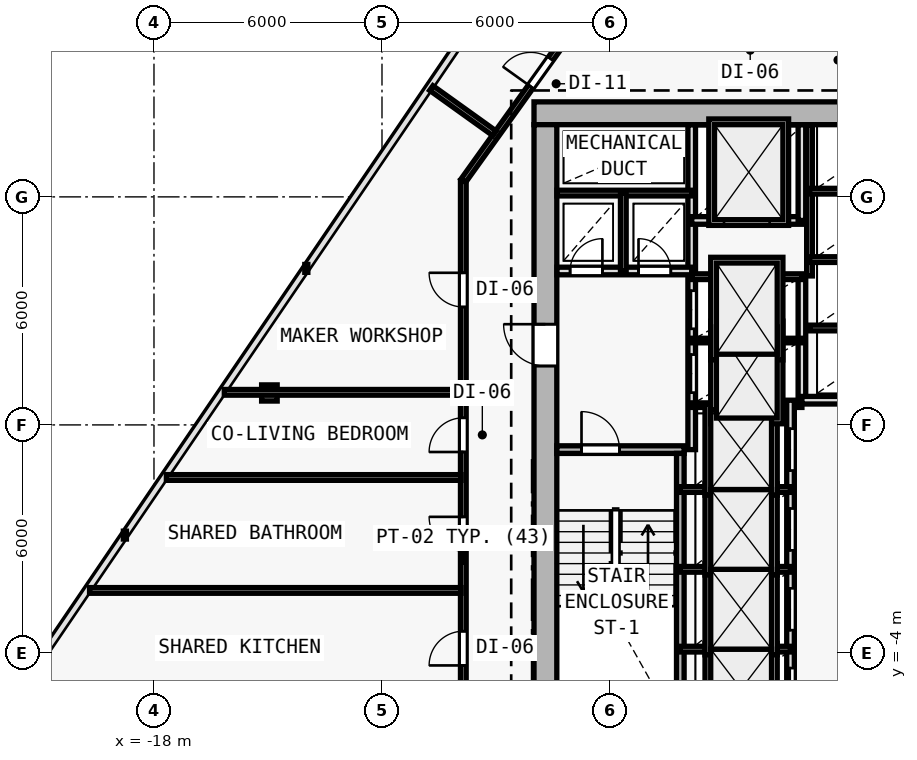
"""IFC4 building model, lengths in metres.
Left out: names, types, materials, properties, quantities, classifications, styles, units other than length and angle.
Written with IfcOpenShell. Run it as: python <this file> out.ifc"""

import sys

from ifc_helpers import new_model, si_unit, direction, frame, frame_2d, origin, origin_2d, place, context, subcontext, project, spatial, rectangle, i_section, extrude, element, fill, save


model = new_model("IFC4")
c1 = context("Model", 3, precision=1e-05, world=origin(), true_north=direction((0.0, 1.0)))
c2 = subcontext(c1, "Body", "Model", "MODEL_VIEW")
j1 = project(units=[si_unit("LENGTHUNIT", "METRE"), si_unit("PLANEANGLEUNIT", "RADIAN")], contexts=[c1])
p1 = place(None, origin())
s1 = spatial("IfcSite", under=j1, at=p1, CompositionType="ELEMENT")
p2 = place(p1, origin())
s2 = spatial("IfcBuilding", under=s1, at=p2, CompositionType="ELEMENT")
p3 = place(p2, frame((0.0, 0.0, 100.5)))
s3 = spatial("IfcBuildingStorey", under=s2, at=p3, CompositionType="ELEMENT", Elevation=100.5)
for number, where, z_axis, x_axis in (
    (1, (-7.7, 10.2, 0.0), (0.0, 0.0, 1.0), (1.0, 0.0, 0.0)),
    (2, (-7.7, 2.0, 0.0), (0.0, 0.0, 1.0), (1.0, 0.0, 0.0)),
):
    element("IfcColumn", number, at=place(p3, frame(where, z_axis=z_axis, x_axis=x_axis)), inside=s3, PredefinedType="COLUMN", context=c2, shape_type="SweptSolid", body=[
        extrude(i_section(OverallWidth=0.409, OverallDepth=0.425, WebThickness=0.021, FlangeThickness=0.034, FilletRadius=0.015, at=origin_2d()), origin(), (0.0, 0.0, 1.0), 3.6),
    ])
p4 = place(p3, frame((-14.963, 2.84, 0.006), z_axis=(0.017003561856, 0.009590008887, 0.99980943715), x_axis=(-0.491253415567, 0.871016694268, 0.0)))
e3 = element("IfcColumn", 3, at=p4, inside=s3, PredefinedType="COLUMN", context=c2, shape_type="SweptSolid", body=[
    extrude(i_section(OverallWidth=0.409, OverallDepth=0.425, WebThickness=0.021, FlangeThickness=0.034, FilletRadius=0.015, at=origin_2d()), origin(), (0.0, 0.0, 1.0), 3.59),
])
p5 = place(p3, frame((8.0, 10.2, 0.0), z_axis=(0.0, 0.0, 1.0), x_axis=(-1.0, 0.0, 0.0)))
e4 = element("IfcWall", 4, at=p5, inside=s3, PredefinedType="SHEAR", context=c2, shape_type="SweptSolid", body=[
    extrude(rectangle(XDim=16.0, YDim=0.6, at=frame_2d((8.0, 0.0))), origin(), (0.0, 0.0, 1.0), 3.35),
])
p6 = place(p5, frame((4.45, 0.0, 0.0)))
e5 = element("IfcOpeningElement", 5, at=p6, cuts=e4, PredefinedType="OPENING", context=c2, shape_type="SweptSolid", body=[
    extrude(rectangle(XDim=1.1, YDim=2.15, at=frame_2d((0.55, 1.075))), frame((0.0, 0.31, 0.0), z_axis=(0.0, -1.0, 0.0), x_axis=(1.0, 0.0, 0.0)), (0.0, 0.0, 1.0), 0.62),
])
p7 = place(p3, frame((-7.7, -9.1, 0.0), z_axis=(0.0, 0.0, 1.0), x_axis=(0.0, 1.0, 0.0)))
e6 = element("IfcWall", 6, at=p7, inside=s3, PredefinedType="SHEAR", context=c2, shape_type="SweptSolid", body=[
    extrude(rectangle(XDim=19.0, YDim=0.6, at=frame_2d((9.5, 0.0))), origin(), (0.0, 0.0, 1.0), 3.35),
])
p8 = place(p7, frame((12.65, 0.0, 0.0)))
e7 = element("IfcOpeningElement", 7, at=p8, cuts=e6, PredefinedType="OPENING", context=c2, shape_type="SweptSolid", body=[
    extrude(rectangle(XDim=1.1, YDim=2.15, at=frame_2d((0.55, 1.075))), frame((0.0, 0.31, 0.0), z_axis=(0.0, -1.0, 0.0), x_axis=(1.0, 0.0, 0.0)), (0.0, 0.0, 1.0), 0.62),
])
p9 = place(p3, frame((-7.4, 1.35, 0.0), z_axis=(0.0, 0.0, 1.0), x_axis=(1.0, 0.0, 0.0)))
e8 = element("IfcWall", 8, at=p9, inside=s3, PredefinedType="SOLIDWALL", context=c2, shape_type="SweptSolid", body=[
    extrude(rectangle(XDim=3.35, YDim=0.2, at=frame_2d((1.675, 0.0))), origin(), (0.0, 0.0, 1.0), 3.35),
])
p10 = place(p9, frame((0.65, 0.0, 0.0)))
e9 = element("IfcOpeningElement", 9, at=p10, cuts=e8, PredefinedType="OPENING", context=c2, shape_type="SweptSolid", body=[
    extrude(rectangle(XDim=1.0, YDim=2.15, at=frame_2d((0.5, 1.075))), frame((0.0, 0.11, 0.0), z_axis=(0.0, -1.0, 0.0), x_axis=(1.0, 0.0, 0.0)), (0.0, 0.0, 1.0), 0.22),
])
p11 = place(p3, frame((-4.15, -5.95, 0.0), z_axis=(0.0, 0.0, 1.0), x_axis=(0.0, 1.0, 0.0)))
e10 = element("IfcWall", 10, at=p11, inside=s3, PredefinedType="SOLIDWALL", context=c2, shape_type="SweptSolid", body=[
    extrude(rectangle(XDim=7.2, YDim=0.2, at=frame_2d((3.6, 0.0))), origin(), (0.0, 0.0, 1.0), 3.35),
])
p12 = place(p3, frame((-3.85, 1.35, 0.0), z_axis=(0.0, 0.0, 1.0), x_axis=(0.0, 1.0, 0.0)))
e11 = element("IfcWall", 11, at=p12, inside=s3, PredefinedType="SOLIDWALL", context=c2, shape_type="SweptSolid", body=[
    extrude(rectangle(XDim=8.545, YDim=0.2, at=frame_2d((4.272, 0.0))), origin(), (0.0, 0.0, 1.0), 3.35),
])
p13 = place(p12, frame((1.5, 0.0, 0.0)))
e12 = element("IfcOpeningElement", 12, at=p13, cuts=e11, PredefinedType="OPENING", context=c2, shape_type="SweptSolid", body=[
    extrude(rectangle(XDim=1.0, YDim=2.15, at=frame_2d((0.5, 1.075))), frame((0.0, 0.11, 0.0), z_axis=(0.0, -1.0, 0.0), x_axis=(1.0, 0.0, 0.0)), (0.0, 0.0, 1.0), 0.22),
])
p14 = place(p12, frame((3.18, 0.0, 0.0)))
e13 = element("IfcOpeningElement", 13, at=p14, cuts=e11, PredefinedType="OPENING", context=c2, shape_type="SweptSolid", body=[
    extrude(rectangle(XDim=1.0, YDim=2.15, at=frame_2d((0.5, 1.075))), frame((0.0, 0.11, 0.0), z_axis=(0.0, -1.0, 0.0), x_axis=(1.0, 0.0, 0.0)), (0.0, 0.0, 1.0), 0.22),
])
p15 = place(p3, frame((-7.395, 6.05, 0.0), z_axis=(0.0, 0.0, 1.0), x_axis=(1.0, 0.0, 0.0)))
e14 = element("IfcWall", 14, at=p15, inside=s3, PredefinedType="SOLIDWALL", context=c2, shape_type="SweptSolid", body=[
    extrude(rectangle(XDim=3.545, YDim=0.2, at=frame_2d((1.772, 0.0))), origin(), (0.0, 0.0, 1.0), 3.35),
])
p16 = place(p15, frame((0.345, 0.0, 0.0)))
e15 = element("IfcOpeningElement", 15, at=p16, cuts=e14, PredefinedType="OPENING", context=c2, shape_type="SweptSolid", body=[
    extrude(rectangle(XDim=0.85, YDim=2.1, at=frame_2d((0.425, 1.05))), frame((0.0, 0.11, 0.0), z_axis=(0.0, -1.0, 0.0), x_axis=(1.0, 0.0, 0.0)), (0.0, 0.0, 1.0), 0.22),
])
p17 = place(p15, frame((2.145, 0.0, 0.0)))
e16 = element("IfcOpeningElement", 16, at=p17, cuts=e14, PredefinedType="OPENING", context=c2, shape_type="SweptSolid", body=[
    extrude(rectangle(XDim=0.85, YDim=2.1, at=frame_2d((0.425, 1.05))), frame((0.0, 0.11, 0.0), z_axis=(0.0, -1.0, 0.0), x_axis=(1.0, 0.0, 0.0)), (0.0, 0.0, 1.0), 0.22),
])
p18 = place(p3, frame((-7.395, 8.1, 0.0), z_axis=(0.0, 0.0, 1.0), x_axis=(1.0, 0.0, 0.0)))
e17 = element("IfcWall", 17, at=p18, inside=s3, PredefinedType="PARTITIONING", context=c2, shape_type="SweptSolid", body=[
    extrude(rectangle(XDim=3.545, YDim=0.15, at=frame_2d((1.772, 0.0))), origin(), (0.0, 0.0, 1.0), 3.35),
])
p19 = place(p3, frame((-5.65, 6.05, 0.0), z_axis=(0.0, 0.0, 1.0), x_axis=(0.0, 1.0, 0.0)))
e18 = element("IfcWall", 18, at=p19, inside=s3, PredefinedType="PARTITIONING", context=c2, shape_type="SweptSolid", body=[
    extrude(rectangle(XDim=2.05, YDim=0.15, at=frame_2d((1.025, 0.0))), origin(), (0.0, 0.0, 1.0), 3.35),
])
p20 = place(p3, frame((-0.95, 2.65, 0.0), z_axis=(0.0, 0.0, 1.0), x_axis=(0.0, 1.0, 0.0)))
e19 = element("IfcWall", 19, at=p20, inside=s3, PredefinedType="SOLIDWALL", context=c2, shape_type="SweptSolid", body=[
    extrude(rectangle(XDim=3.27, YDim=0.2, at=frame_2d((1.635, 0.0))), origin(), (0.0, 0.0, 1.0), 3.35),
])
for number, where, z_axis, x_axis in (
    (20, (-3.85, 2.52, 0.0), (0.0, 0.0, 1.0), (1.0, 0.0, 0.0)),
    (21, (-3.85, 4.22, 0.0), (0.0, 0.0, 1.0), (1.0, 0.0, 0.0)),
):
    element("IfcWall", number, at=place(p3, frame(where, z_axis=z_axis, x_axis=x_axis)), inside=s3, PredefinedType="PARTITIONING", context=c2, shape_type="SweptSolid", body=[
        extrude(rectangle(XDim=2.9, YDim=0.12, at=frame_2d((1.45, 0.0))), origin(), (0.0, 0.0, 1.0), 3.35),
    ])
p21 = place(p3, frame((-3.85, 5.9, 0.0), z_axis=(0.0, 0.0, 1.0), x_axis=(1.0, 0.0, 0.0)))
e22 = element("IfcWall", 22, at=p21, inside=s3, PredefinedType="PARTITIONING", context=c2, shape_type="SweptSolid", body=[
    extrude(rectangle(XDim=2.9, YDim=0.15, at=frame_2d((1.45, 0.0))), origin(), (0.0, 0.0, 1.0), 3.35),
])
p22 = place(p3, frame((-3.85, 7.38, 0.0), z_axis=(0.0, 0.0, 1.0), x_axis=(1.0, 0.0, 0.0)))
e23 = element("IfcWall", 23, at=p22, inside=s3, PredefinedType="SOLIDWALL", context=c2, shape_type="SweptSolid", body=[
    extrude(rectangle(XDim=2.9, YDim=0.2, at=frame_2d((1.45, 0.0))), origin(), (0.0, 0.0, 1.0), 3.35),
])
p23 = place(p22, frame((0.85, 0.0, 0.0)))
e24 = element("IfcOpeningElement", 24, at=p23, cuts=e23, PredefinedType="OPENING", context=c2, shape_type="SweptSolid", body=[
    extrude(rectangle(XDim=1.2, YDim=2.2, at=frame_2d((0.6, 1.1))), frame((0.0, 0.11, 0.0), z_axis=(0.0, -1.0, 0.0), x_axis=(1.0, 0.0, 0.0)), (0.0, 0.0, 1.0), 0.22),
])
p24 = place(p3, frame((-0.95, 7.38, 0.0), z_axis=(0.0, 0.0, 1.0), x_axis=(0.0, 1.0, 0.0)))
e25 = element("IfcWall", 25, at=p24, inside=s3, PredefinedType="SOLIDWALL", context=c2, shape_type="SweptSolid", body=[
    extrude(rectangle(XDim=2.515, YDim=0.2, at=frame_2d((1.258, 0.0))), origin(), (0.0, 0.0, 1.0), 3.35),
])
p25 = place(p3, frame((-1.25, -6.05, 0.0), z_axis=(0.0, 0.0, 1.0), x_axis=(0.0, 1.0, 0.0)))
e26 = element("IfcWall", 26, at=p25, inside=s3, PredefinedType="SOLIDWALL", context=c2, shape_type="SweptSolid", body=[
    extrude(rectangle(XDim=8.7, YDim=0.2, at=frame_2d((4.35, 0.0))), origin(), (0.0, 0.0, 1.0), 3.35),
])
p26 = place(p25, frame((0.55, 0.0, 0.0)))
e27 = element("IfcOpeningElement", 27, at=p26, cuts=e26, PredefinedType="OPENING", context=c2, shape_type="SweptSolid", body=[
    extrude(rectangle(XDim=1.1, YDim=2.15, at=frame_2d((0.55, 1.075))), frame((0.0, 0.11, 0.0), z_axis=(0.0, -1.0, 0.0), x_axis=(1.0, 0.0, 0.0)), (0.0, 0.0, 1.0), 0.22),
])
p27 = place(p25, frame((2.65, 0.0, 0.0)))
e28 = element("IfcOpeningElement", 28, at=p27, cuts=e26, PredefinedType="OPENING", context=c2, shape_type="SweptSolid", body=[
    extrude(rectangle(XDim=1.1, YDim=2.15, at=frame_2d((0.55, 1.075))), frame((0.0, 0.11, 0.0), z_axis=(0.0, -1.0, 0.0), x_axis=(1.0, 0.0, 0.0)), (0.0, 0.0, 1.0), 0.22),
])
p28 = place(p25, frame((4.75, 0.0, 0.0)))
e29 = element("IfcOpeningElement", 29, at=p28, cuts=e26, PredefinedType="OPENING", context=c2, shape_type="SweptSolid", body=[
    extrude(rectangle(XDim=1.1, YDim=2.15, at=frame_2d((0.55, 1.075))), frame((0.0, 0.11, 0.0), z_axis=(0.0, -1.0, 0.0), x_axis=(1.0, 0.0, 0.0)), (0.0, 0.0, 1.0), 0.22),
])
p29 = place(p25, frame((6.85, 0.0, 0.0)))
e30 = element("IfcOpeningElement", 30, at=p29, cuts=e26, PredefinedType="OPENING", context=c2, shape_type="SweptSolid", body=[
    extrude(rectangle(XDim=1.1, YDim=2.15, at=frame_2d((0.55, 1.075))), frame((0.0, 0.11, 0.0), z_axis=(0.0, -1.0, 0.0), x_axis=(1.0, 0.0, 0.0)), (0.0, 0.0, 1.0), 0.22),
])
for number, where, z_axis, x_axis in (
    (31, (-4.15, -3.9, 0.0), (0.0, 0.0, 1.0), (1.0, 0.0, 0.0)),
    (32, (-4.15, -1.8, 0.0), (0.0, 0.0, 1.0), (1.0, 0.0, 0.0)),
    (33, (-4.15, 0.3, 0.0), (0.0, 0.0, 1.0), (1.0, 0.0, 0.0)),
):
    element("IfcWall", number, at=place(p3, frame(where, z_axis=z_axis, x_axis=x_axis)), inside=s3, PredefinedType="PARTITIONING", context=c2, shape_type="SweptSolid", body=[
        extrude(rectangle(XDim=2.9, YDim=0.15, at=frame_2d((1.45, 0.0))), origin(), (0.0, 0.0, 1.0), 3.35),
    ])
p30 = place(p3, frame((-0.95, 2.65, 0.0), z_axis=(0.0, 0.0, 1.0), x_axis=(1.0, 0.0, 0.0)))
e34 = element("IfcWall", 34, at=p30, inside=s3, PredefinedType="SOLIDWALL", context=c2, shape_type="SweptSolid", body=[
    extrude(rectangle(XDim=2.9, YDim=0.2, at=frame_2d((1.45, 0.0))), origin(), (0.0, 0.0, 1.0), 3.35),
])
p31 = place(p3, frame((-0.75, 5.92, 0.0), z_axis=(0.0, 0.0, 1.0), x_axis=(0.0, 1.0, 0.0)))
e35 = element("IfcWall", 35, at=p31, inside=s3, PredefinedType="PARTITIONING", context=c2, shape_type="SweptSolid", body=[
    extrude(rectangle(XDim=3.975, YDim=0.15, at=frame_2d((1.988, 0.0))), origin(), (0.0, 0.0, 1.0), 3.35),
])
for number, where, z_axis, x_axis in (
    (36, (-0.75, 4.55, 0.0), (0.0, 0.0, 1.0), (1.0, 0.0, 0.0)),
    (37, (-0.75, 6.35, 0.0), (0.0, 0.0, 1.0), (1.0, 0.0, 0.0)),
    (38, (-0.75, 8.15, 0.0), (0.0, 0.0, 1.0), (1.0, 0.0, 0.0)),
):
    element("IfcWall", number, at=place(p3, frame(where, z_axis=z_axis, x_axis=x_axis)), inside=s3, PredefinedType="PARTITIONING", context=c2, shape_type="SweptSolid", body=[
        extrude(rectangle(XDim=2.7, YDim=0.15, at=frame_2d((1.35, 0.0))), origin(), (0.0, 0.0, 1.0), 3.35),
    ])
p32 = place(p3, frame((-9.86, -11.56, 0.0), z_axis=(0.0, 0.0, 1.0), x_axis=(0.0, 1.0, 0.0)))
e39 = element("IfcWall", 39, at=p32, inside=s3, PredefinedType="PARTITIONING", context=c2, shape_type="SweptSolid", body=[
    extrude(rectangle(XDim=19.986, YDim=0.15, at=frame_2d((9.993, 0.0))), origin(), (0.0, 0.0, 1.0), 2.705),
])
p33 = place(p32, frame((10.241, 0.0, 0.0)))
e40 = element("IfcOpeningElement", 40, at=p33, cuts=e39, PredefinedType="OPENING", context=c2, shape_type="SweptSolid", body=[
    extrude(rectangle(XDim=0.9, YDim=2.1, at=frame_2d((0.45, 1.05))), frame((0.0, 0.085, 0.0), z_axis=(0.0, -1.0, 0.0), x_axis=(1.0, 0.0, 0.0)), (0.0, 0.0, 1.0), 0.17),
])
p34 = place(p32, frame((7.231, 0.0, 0.0)))
e41 = element("IfcOpeningElement", 41, at=p34, cuts=e39, PredefinedType="OPENING", context=c2, shape_type="SweptSolid", body=[
    extrude(rectangle(XDim=0.9, YDim=2.1, at=frame_2d((0.45, 1.05))), frame((0.0, 0.085, 0.0), z_axis=(0.0, -1.0, 0.0), x_axis=(1.0, 0.0, 0.0)), (0.0, 0.0, 1.0), 0.17),
])
p35 = place(p32, frame((4.259, 0.0, 0.0)))
e42 = element("IfcOpeningElement", 42, at=p35, cuts=e39, PredefinedType="OPENING", context=c2, shape_type="SweptSolid", body=[
    extrude(rectangle(XDim=0.9, YDim=2.1, at=frame_2d((0.45, 1.05))), frame((0.0, 0.085, 0.0), z_axis=(0.0, -1.0, 0.0), x_axis=(1.0, 0.0, 0.0)), (0.0, 0.0, 1.0), 0.17),
])
p36 = place(p32, frame((1.27, 0.0, 0.0)))
e43 = element("IfcOpeningElement", 43, at=p36, cuts=e39, PredefinedType="OPENING", context=c2, shape_type="SweptSolid", body=[
    extrude(rectangle(XDim=0.9, YDim=2.1, at=frame_2d((0.45, 1.05))), frame((0.0, 0.085, 0.0), z_axis=(0.0, -1.0, 0.0), x_axis=(1.0, 0.0, 0.0)), (0.0, 0.0, 1.0), 0.17),
])
p37 = place(p32, frame((16.663, 0.0, 0.0)))
e44 = element("IfcOpeningElement", 44, at=p37, cuts=e39, PredefinedType="OPENING", context=c2, shape_type="SweptSolid", body=[
    extrude(rectangle(XDim=0.9, YDim=2.1, at=frame_2d((0.45, 1.05))), frame((0.0, 0.085, 0.0), z_axis=(0.0, -1.0, 0.0), x_axis=(1.0, 0.0, 0.0)), (0.0, 0.0, 1.0), 0.17),
])
p38 = place(p32, frame((12.847, 0.0, 0.0)))
e45 = element("IfcOpeningElement", 45, at=p38, cuts=e39, PredefinedType="OPENING", context=c2, shape_type="SweptSolid", body=[
    extrude(rectangle(XDim=0.9, YDim=2.1, at=frame_2d((0.45, 1.05))), frame((0.0, 0.085, 0.0), z_axis=(0.0, -1.0, 0.0), x_axis=(1.0, 0.0, 0.0)), (0.0, 0.0, 1.0), 0.17),
])
p39 = place(p3, frame((-9.86, 8.426, 0.0), z_axis=(0.0, 0.0, 1.0), x_axis=(0.582449511476, 0.812866881218, 0.0)))
e46 = element("IfcWall", 46, at=p39, inside=s3, PredefinedType="PARTITIONING", context=c2, shape_type="SweptSolid", body=[
    extrude(rectangle(XDim=4.84, YDim=0.15, at=frame_2d((2.42, 0.0))), origin(), (0.0, 0.0, 1.0), 2.965),
])
p40 = place(p39, frame((3.046, 0.0, 0.0)))
e47 = element("IfcOpeningElement", 47, at=p40, cuts=e46, PredefinedType="OPENING", context=c2, shape_type="SweptSolid", body=[
    extrude(rectangle(XDim=0.9, YDim=2.1, at=frame_2d((0.45, 1.05))), frame((0.0, 0.085, 0.0), z_axis=(0.0, -1.0, 0.0), x_axis=(1.0, 0.0, 0.0)), (0.0, 0.0, 1.0), 0.17),
])
p41 = place(p3, frame((-9.92, 2.857, 0.0), z_axis=(0.0, 0.0, 1.0), x_axis=(-1.0, 0.0, 0.0)))
e48 = element("IfcWall", 48, at=p41, inside=s3, PredefinedType="PARTITIONING", context=c2, shape_type="SweptSolid", body=[
    extrude(rectangle(XDim=6.229, YDim=0.15, at=frame_2d((3.115, 0.0))), origin(), (0.0, 0.0, 1.0), 2.835),
])
p42 = place(p3, frame((-9.92, -2.355, 0.0), z_axis=(0.0, 0.0, 1.0), x_axis=(-1.0, 0.0, 0.0)))
e49 = element("IfcWall", 49, at=p42, inside=s3, PredefinedType="PARTITIONING", context=c2, shape_type="SweptSolid", body=[
    extrude(rectangle(XDim=9.775, YDim=0.15, at=frame_2d((4.888, 0.0))), origin(), (0.0, 0.0, 1.0), 2.725),
])
p43 = place(p3, frame((-9.041, 9.673, 0.0), z_axis=(0.0, 0.0, 1.0), x_axis=(-0.812933955931, 0.582355890581, 0.0)))
e50 = element("IfcWall", 50, at=p43, inside=s3, PredefinedType="PARTITIONING", context=c2, shape_type="SweptSolid", body=[
    extrude(rectangle(XDim=2.045, YDim=0.15, at=frame_2d((1.022, 0.0))), origin(), (0.0, 0.0, 1.0), 2.835),
])
p44 = place(p3, frame((-9.92, 0.617, 0.0), z_axis=(0.0, 0.0, 1.0), x_axis=(-1.0, 0.0, 0.0)))
e51 = element("IfcWall", 51, at=p44, inside=s3, PredefinedType="PARTITIONING", context=c2, shape_type="SweptSolid", body=[
    extrude(rectangle(XDim=7.753, YDim=0.15, at=frame_2d((3.876, 0.0))), origin(), (0.0, 0.0, 1.0), 2.725),
])
p45 = place(p8, origin())
e52 = element("IfcDoor", 52, at=p45, inside=s3, OperationType="SINGLE_SWING_RIGHT", PredefinedType="DOOR", context=c2, shape_type="SweptSolid", body=[
    extrude(rectangle(XDim=1.1, YDim=2.15, at=frame_2d((0.55, 1.075))), frame((0.0, 0.025, 0.0), z_axis=(0.0, -1.0, 0.0), x_axis=(1.0, 0.0, 0.0)), (0.0, 0.0, 1.0), 0.05),
])
fill(e7, e52)
p46 = place(p10, origin())
e53 = element("IfcDoor", 53, at=p46, inside=s3, OperationType="SINGLE_SWING_LEFT", PredefinedType="DOOR", context=c2, shape_type="SweptSolid", body=[
    extrude(rectangle(XDim=1.0, YDim=2.15, at=frame_2d((0.5, 1.075))), frame((0.0, 0.025, 0.0), z_axis=(0.0, -1.0, 0.0), x_axis=(1.0, 0.0, 0.0)), (0.0, 0.0, 1.0), 0.05),
])
fill(e9, e53)
p47 = place(p16, origin())
e54 = element("IfcDoor", 54, at=p47, inside=s3, OperationType="SINGLE_SWING_RIGHT", PredefinedType="DOOR", context=c2, shape_type="SweptSolid", body=[
    extrude(rectangle(XDim=0.85, YDim=2.1, at=frame_2d((0.425, 1.05))), frame((0.0, 0.025, 0.0), z_axis=(0.0, -1.0, 0.0), x_axis=(1.0, 0.0, 0.0)), (0.0, 0.0, 1.0), 0.05),
])
fill(e15, e54)
p48 = place(p17, origin())
e55 = element("IfcDoor", 55, at=p48, inside=s3, OperationType="SINGLE_SWING_LEFT", PredefinedType="DOOR", context=c2, shape_type="SweptSolid", body=[
    extrude(rectangle(XDim=0.85, YDim=2.1, at=frame_2d((0.425, 1.05))), frame((0.0, 0.025, 0.0), z_axis=(0.0, -1.0, 0.0), x_axis=(1.0, 0.0, 0.0)), (0.0, 0.0, 1.0), 0.05),
])
fill(e16, e55)
p49 = place(p23, origin())
e56 = element("IfcDoor", 56, at=p49, inside=s3, OperationType="DOUBLE_DOOR_SLIDING", PredefinedType="DOOR", context=c2, shape_type="SweptSolid", body=[
    extrude(rectangle(XDim=1.2, YDim=2.2, at=frame_2d((0.6, 1.1))), frame((0.0, 0.025, 0.0), z_axis=(0.0, -1.0, 0.0), x_axis=(1.0, 0.0, 0.0)), (0.0, 0.0, 1.0), 0.05),
])
fill(e24, e56)
p50 = place(p26, origin())
e57 = element("IfcDoor", 57, at=p50, inside=s3, OperationType="DOUBLE_DOOR_SLIDING", PredefinedType="DOOR", context=c2, shape_type="SweptSolid", body=[
    extrude(rectangle(XDim=1.1, YDim=2.15, at=frame_2d((0.55, 1.075))), frame((0.0, 0.025, 0.0), z_axis=(0.0, -1.0, 0.0), x_axis=(1.0, 0.0, 0.0)), (0.0, 0.0, 1.0), 0.05),
])
fill(e27, e57)
p51 = place(p27, origin())
e58 = element("IfcDoor", 58, at=p51, inside=s3, OperationType="DOUBLE_DOOR_SLIDING", PredefinedType="DOOR", context=c2, shape_type="SweptSolid", body=[
    extrude(rectangle(XDim=1.1, YDim=2.15, at=frame_2d((0.55, 1.075))), frame((0.0, 0.025, 0.0), z_axis=(0.0, -1.0, 0.0), x_axis=(1.0, 0.0, 0.0)), (0.0, 0.0, 1.0), 0.05),
])
fill(e28, e58)
p52 = place(p28, origin())
e59 = element("IfcDoor", 59, at=p52, inside=s3, OperationType="DOUBLE_DOOR_SLIDING", PredefinedType="DOOR", context=c2, shape_type="SweptSolid", body=[
    extrude(rectangle(XDim=1.1, YDim=2.15, at=frame_2d((0.55, 1.075))), frame((0.0, 0.025, 0.0), z_axis=(0.0, -1.0, 0.0), x_axis=(1.0, 0.0, 0.0)), (0.0, 0.0, 1.0), 0.05),
])
fill(e29, e59)
p53 = place(p29, origin())
e60 = element("IfcDoor", 60, at=p53, inside=s3, OperationType="DOUBLE_DOOR_SLIDING", PredefinedType="DOOR", context=c2, shape_type="SweptSolid", body=[
    extrude(rectangle(XDim=1.1, YDim=2.15, at=frame_2d((0.55, 1.075))), frame((0.0, 0.025, 0.0), z_axis=(0.0, -1.0, 0.0), x_axis=(1.0, 0.0, 0.0)), (0.0, 0.0, 1.0), 0.05),
])
fill(e30, e60)
p54 = place(p13, origin())
e61 = element("IfcDoor", 61, at=p54, inside=s3, OperationType="DOUBLE_DOOR_SLIDING", PredefinedType="DOOR", context=c2, shape_type="SweptSolid", body=[
    extrude(rectangle(XDim=1.0, YDim=2.15, at=frame_2d((0.5, 1.075))), frame((0.0, 0.025, 0.0), z_axis=(0.0, -1.0, 0.0), x_axis=(1.0, 0.0, 0.0)), (0.0, 0.0, 1.0), 0.05),
])
fill(e12, e61)
p55 = place(p14, origin())
e62 = element("IfcDoor", 62, at=p55, inside=s3, OperationType="DOUBLE_DOOR_SLIDING", PredefinedType="DOOR", context=c2, shape_type="SweptSolid", body=[
    extrude(rectangle(XDim=1.0, YDim=2.15, at=frame_2d((0.5, 1.075))), frame((0.0, 0.025, 0.0), z_axis=(0.0, -1.0, 0.0), x_axis=(1.0, 0.0, 0.0)), (0.0, 0.0, 1.0), 0.05),
])
fill(e13, e62)
p56 = place(p33, origin())
e63 = element("IfcDoor", 63, at=p56, inside=s3, OperationType="SINGLE_SWING_RIGHT", PredefinedType="DOOR", context=c2, shape_type="SweptSolid", body=[
    extrude(rectangle(XDim=0.9, YDim=2.1, at=frame_2d((0.45, 1.05))), frame((0.0, 0.025, 0.0), z_axis=(0.0, -1.0, 0.0), x_axis=(1.0, 0.0, 0.0)), (0.0, 0.0, 1.0), 0.05),
])
fill(e40, e63)
p57 = place(p34, origin())
e64 = element("IfcDoor", 64, at=p57, inside=s3, OperationType="SINGLE_SWING_LEFT", PredefinedType="DOOR", context=c2, shape_type="SweptSolid", body=[
    extrude(rectangle(XDim=0.9, YDim=2.1, at=frame_2d((0.45, 1.05))), frame((0.0, 0.025, 0.0), z_axis=(0.0, -1.0, 0.0), x_axis=(1.0, 0.0, 0.0)), (0.0, 0.0, 1.0), 0.05),
])
fill(e41, e64)
p58 = place(p40, origin())
e65 = element("IfcDoor", 65, at=p58, inside=s3, OperationType="SINGLE_SWING_LEFT", PredefinedType="DOOR", context=c2, shape_type="SweptSolid", body=[
    extrude(rectangle(XDim=0.9, YDim=2.1, at=frame_2d((0.45, 1.05))), frame((0.0, 0.025, 0.0), z_axis=(0.0, -1.0, 0.0), x_axis=(1.0, 0.0, 0.0)), (0.0, 0.0, 1.0), 0.05),
])
fill(e47, e65)
p59 = place(p37, origin())
e66 = element("IfcDoor", 66, at=p59, inside=s3, OperationType="SINGLE_SWING_RIGHT", PredefinedType="DOOR", context=c2, shape_type="SweptSolid", body=[
    extrude(rectangle(XDim=0.9, YDim=2.1, at=frame_2d((0.45, 1.05))), frame((0.0, 0.025, 0.0), z_axis=(0.0, -1.0, 0.0), x_axis=(1.0, 0.0, 0.0)), (0.0, 0.0, 1.0), 0.05),
])
fill(e44, e66)
p60 = place(p38, origin())
e67 = element("IfcDoor", 67, at=p60, inside=s3, OperationType="SINGLE_SWING_LEFT", PredefinedType="DOOR", context=c2, shape_type="SweptSolid", body=[
    extrude(rectangle(XDim=0.9, YDim=2.1, at=frame_2d((0.45, 1.05))), frame((0.0, 0.025, 0.0), z_axis=(0.0, -1.0, 0.0), x_axis=(1.0, 0.0, 0.0)), (0.0, 0.0, 1.0), 0.05),
])
fill(e45, e67)
save(model, sys.argv[1])
